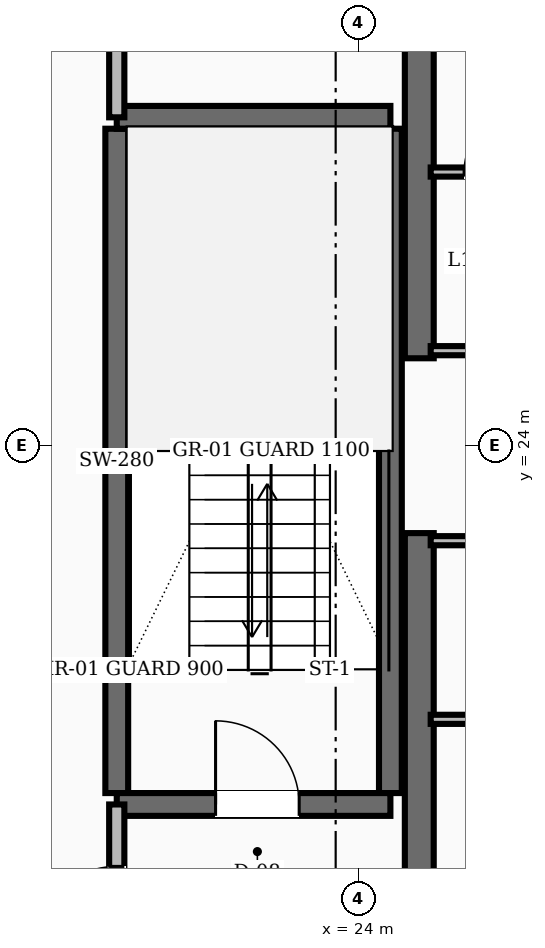
"""IFC4 building model, lengths in metres.
Left out: names, types, materials, properties, quantities, classifications, styles, units other than length and angle.
Written with IfcOpenShell. Run it as: python <this file> out.ifc"""

import sys

from ifc_helpers import new_model, si_unit, direction, frame, frame_2d, origin, place, context, subcontext, project, spatial, rectangle, extrude, element, fill, save


model = new_model("IFC4")
c1 = context("Model", 3, precision=1e-05, world=origin(), true_north=direction((0.0, 1.0)))
c2 = subcontext(c1, "Body", "Model", "MODEL_VIEW")
j1 = project(units=[si_unit("LENGTHUNIT", "METRE"), si_unit("PLANEANGLEUNIT", "RADIAN")], contexts=[c1])
p1 = place(None, origin())
s1 = spatial("IfcSite", under=j1, at=p1, CompositionType="ELEMENT")
p2 = place(p1, origin())
s2 = spatial("IfcBuilding", under=s1, at=p2, CompositionType="ELEMENT")
p3 = place(p2, frame((0.0, 0.0, 62.8)))
s3 = spatial("IfcBuildingStorey", under=s2, at=p3, CompositionType="ELEMENT", Elevation=62.8)
for number, where, z_axis, x_axis in (
    (1, (24.8, 16.55, 0.0), (0.0, 0.0, 1.0), (0.0, 1.0, 0.0)),
    (2, (24.8, 25.15, 0.0), (0.0, 0.0, 1.0), (0.0, 1.0, 0.0)),
):
    element("IfcWall", number, at=place(p3, frame(where, z_axis=z_axis, x_axis=x_axis)), inside=s3, PredefinedType="SHEAR", context=c2, shape_type="SweptSolid", body=[
        extrude(rectangle(XDim=6.3, YDim=0.38, at=frame_2d((3.15, 0.0))), origin(), (0.0, 0.0, 1.0), 3.6),
    ])
for number, where, z_axis, x_axis in (
    (3, (20.82, 19.43, 0.0), (0.0, 0.0, 1.0), (0.0, 1.0, 0.0)),
    (4, (24.42, 19.43, 0.0), (0.0, 0.0, 1.0), (0.0, 1.0, 0.0)),
):
    element("IfcWall", number, at=place(p3, frame(where, z_axis=z_axis, x_axis=x_axis)), inside=s3, PredefinedType="SHEAR", context=c2, shape_type="SweptSolid", body=[
        extrude(rectangle(XDim=8.74, YDim=0.3, at=frame_2d((4.37, 0.0))), origin(), (0.0, 0.0, 1.0), 3.6),
    ])
p4 = place(p3, frame((20.82, 19.28, 0.0), z_axis=(0.0, 0.0, 1.0), x_axis=(1.0, 0.0, 0.0)))
e5 = element("IfcWall", 5, at=p4, inside=s3, PredefinedType="SHEAR", context=c2, shape_type="SweptSolid", body=[
    extrude(rectangle(XDim=3.6, YDim=0.3, at=frame_2d((1.8, 0.0))), origin(), (0.0, 0.0, 1.0), 3.6),
])
p5 = place(p4, frame((1.3, 0.0, 0.0)))
e6 = element("IfcOpeningElement", 6, at=p5, cuts=e5, PredefinedType="OPENING", context=c2, shape_type="SweptSolid", body=[
    extrude(rectangle(XDim=1.1, YDim=2.1, at=frame_2d((0.55, 1.05))), frame((0.0, 0.16, 0.0), z_axis=(0.0, -1.0, 0.0), x_axis=(1.0, 0.0, 0.0)), (0.0, 0.0, 1.0), 0.32),
])
p6 = place(p3, frame((20.82, 28.32, 0.0), z_axis=(0.0, 0.0, 1.0), x_axis=(1.0, 0.0, 0.0)))
e7 = element("IfcWall", 7, at=p6, inside=s3, PredefinedType="SHEAR", context=c2, shape_type="SweptSolid", body=[
    extrude(rectangle(XDim=3.6, YDim=0.3, at=frame_2d((1.8, 0.0))), origin(), (0.0, 0.0, 1.0), 3.6),
])
p7 = place(p3, frame((20.82, 16.55, 0.0), z_axis=(0.0, 0.0, 1.0), x_axis=(0.0, 1.0, 0.0)))
e8 = element("IfcWall", 8, at=p7, inside=s3, PredefinedType="SOLIDWALL", context=c2, shape_type="SweptSolid", body=[
    extrude(rectangle(XDim=2.73, YDim=0.2, at=frame_2d((1.365, 0.0))), origin(), (0.0, 0.0, 1.0), 2.71),
])
p8 = place(p7, frame((0.815, 0.0, 0.0)))
e9 = element("IfcOpeningElement", 9, at=p8, cuts=e8, PredefinedType="OPENING", context=c2, shape_type="SweptSolid", body=[
    extrude(rectangle(XDim=1.1, YDim=2.1, at=frame_2d((0.55, 1.05))), frame((0.0, 0.11, 0.0), z_axis=(0.0, -1.0, 0.0), x_axis=(1.0, 0.0, 0.0)), (0.0, 0.0, 1.0), 0.22),
])
p9 = place(p3, frame((20.82, 28.32, 0.0), z_axis=(0.0, 0.0, 1.0), x_axis=(0.0, 1.0, 0.0)))
e10 = element("IfcWall", 10, at=p9, inside=s3, PredefinedType="SOLIDWALL", context=c2, shape_type="SweptSolid", body=[
    extrude(rectangle(XDim=3.13, YDim=0.2, at=frame_2d((1.565, 0.0))), origin(), (0.0, 0.0, 1.0), 2.71),
])
p10 = place(p9, frame((1.09, 0.0, 0.0)))
e11 = element("IfcOpeningElement", 11, at=p10, cuts=e10, PredefinedType="OPENING", context=c2, shape_type="SweptSolid", body=[
    extrude(rectangle(XDim=0.95, YDim=2.1, at=frame_2d((0.475, 1.05))), frame((0.0, 0.11, 0.0), z_axis=(0.0, -1.0, 0.0), x_axis=(1.0, 0.0, 0.0)), (0.0, 0.0, 1.0), 0.22),
])
p11 = place(p3, frame((24.95, 25.25, 0.0), z_axis=(0.0, 0.0, 1.0), x_axis=(1.0, 0.0, 0.0)))
e12 = element("IfcWall", 12, at=p11, inside=s3, PredefinedType="PARTITIONING", context=c2, shape_type="SweptSolid", body=[
    extrude(rectangle(XDim=3.2, YDim=0.12, at=frame_2d((1.6, 0.0))), origin(), (0.0, 0.0, 1.0), 2.71),
])
p12 = place(p11, frame((1.125, 0.0, 0.0)))
e13 = element("IfcOpeningElement", 13, at=p12, cuts=e12, PredefinedType="OPENING", context=c2, shape_type="SweptSolid", body=[
    extrude(rectangle(XDim=0.95, YDim=2.1, at=frame_2d((0.475, 1.05))), frame((0.0, 0.07, 0.0), z_axis=(0.0, -1.0, 0.0), x_axis=(1.0, 0.0, 0.0)), (0.0, 0.0, 1.0), 0.14),
])
p13 = place(p3, frame((24.95, 22.75, 0.0), z_axis=(0.0, 0.0, 1.0), x_axis=(1.0, 0.0, 0.0)))
e14 = element("IfcWall", 14, at=p13, inside=s3, PredefinedType="PARTITIONING", context=c2, shape_type="SweptSolid", body=[
    extrude(rectangle(XDim=3.2, YDim=0.12, at=frame_2d((1.6, 0.0))), origin(), (0.0, 0.0, 1.0), 2.71),
])
p14 = place(p13, frame((1.125, 0.0, 0.0)))
e15 = element("IfcOpeningElement", 15, at=p14, cuts=e14, PredefinedType="OPENING", context=c2, shape_type="SweptSolid", body=[
    extrude(rectangle(XDim=0.95, YDim=2.1, at=frame_2d((0.475, 1.05))), frame((0.0, 0.07, 0.0), z_axis=(0.0, -1.0, 0.0), x_axis=(1.0, 0.0, 0.0)), (0.0, 0.0, 1.0), 0.14),
])
p15 = place(p3, frame((24.95, 27.6, 0.0), z_axis=(0.0, 0.0, 1.0), x_axis=(1.0, 0.0, 0.0)))
e16 = element("IfcWall", 16, at=p15, inside=s3, PredefinedType="PARTITIONING", context=c2, shape_type="SweptSolid", body=[
    extrude(rectangle(XDim=3.2, YDim=0.12, at=frame_2d((1.6, 0.0))), origin(), (0.0, 0.0, 1.0), 2.71),
])
p16 = place(p15, frame((0.44, 0.0, 0.0)))
e17 = element("IfcOpeningElement", 17, at=p16, cuts=e16, PredefinedType="OPENING", context=c2, shape_type="SweptSolid", body=[
    extrude(rectangle(XDim=0.86, YDim=2.1, at=frame_2d((0.43, 1.05))), frame((0.0, 0.07, 0.0), z_axis=(0.0, -1.0, 0.0), x_axis=(1.0, 0.0, 0.0)), (0.0, 0.0, 1.0), 0.14),
])
p17 = place(p15, frame((1.9, 0.0, 0.0)))
e18 = element("IfcOpeningElement", 18, at=p17, cuts=e16, PredefinedType="OPENING", context=c2, shape_type="SweptSolid", body=[
    extrude(rectangle(XDim=0.86, YDim=2.1, at=frame_2d((0.43, 1.05))), frame((0.0, 0.07, 0.0), z_axis=(0.0, -1.0, 0.0), x_axis=(1.0, 0.0, 0.0)), (0.0, 0.0, 1.0), 0.14),
])
p18 = place(p3, frame((24.95, 20.4, 0.0), z_axis=(0.0, 0.0, 1.0), x_axis=(1.0, 0.0, 0.0)))
e19 = element("IfcWall", 19, at=p18, inside=s3, PredefinedType="PARTITIONING", context=c2, shape_type="SweptSolid", body=[
    extrude(rectangle(XDim=3.2, YDim=0.12, at=frame_2d((1.6, 0.0))), origin(), (0.0, 0.0, 1.0), 2.71),
])
p19 = place(p18, frame((1.125, 0.0, 0.0)))
e20 = element("IfcOpeningElement", 20, at=p19, cuts=e19, PredefinedType="OPENING", context=c2, shape_type="SweptSolid", body=[
    extrude(rectangle(XDim=0.95, YDim=2.1, at=frame_2d((0.475, 1.05))), frame((0.0, 0.07, 0.0), z_axis=(0.0, -1.0, 0.0), x_axis=(1.0, 0.0, 0.0)), (0.0, 0.0, 1.0), 0.14),
])
p20 = place(p5, origin())
e21 = element("IfcDoor", 21, at=p20, inside=s3, OperationType="SINGLE_SWING_LEFT", PredefinedType="DOOR", context=c2, shape_type="SweptSolid", body=[
    extrude(rectangle(XDim=1.1, YDim=2.1, at=frame_2d((0.55, 1.05))), frame((0.0, 0.025, 0.0), z_axis=(0.0, -1.0, 0.0), x_axis=(1.0, 0.0, 0.0)), (0.0, 0.0, 1.0), 0.05),
])
fill(e6, e21)
p21 = place(p8, origin())
e22 = element("IfcDoor", 22, at=p21, inside=s3, OperationType="SINGLE_SWING_LEFT", PredefinedType="DOOR", context=c2, shape_type="SweptSolid", body=[
    extrude(rectangle(XDim=1.1, YDim=2.1, at=frame_2d((0.55, 1.05))), frame((0.0, 0.025, 0.0), z_axis=(0.0, -1.0, 0.0), x_axis=(1.0, 0.0, 0.0)), (0.0, 0.0, 1.0), 0.05),
])
fill(e9, e22)
p22 = place(p16, origin())
e23 = element("IfcDoor", 23, at=p22, inside=s3, OperationType="SINGLE_SWING_RIGHT", PredefinedType="DOOR", context=c2, shape_type="SweptSolid", body=[
    extrude(rectangle(XDim=0.86, YDim=2.1, at=frame_2d((0.43, 1.05))), frame((0.0, 0.025, 0.0), z_axis=(0.0, -1.0, 0.0), x_axis=(1.0, 0.0, 0.0)), (0.0, 0.0, 1.0), 0.05),
])
fill(e17, e23)
save(model, sys.argv[1])
